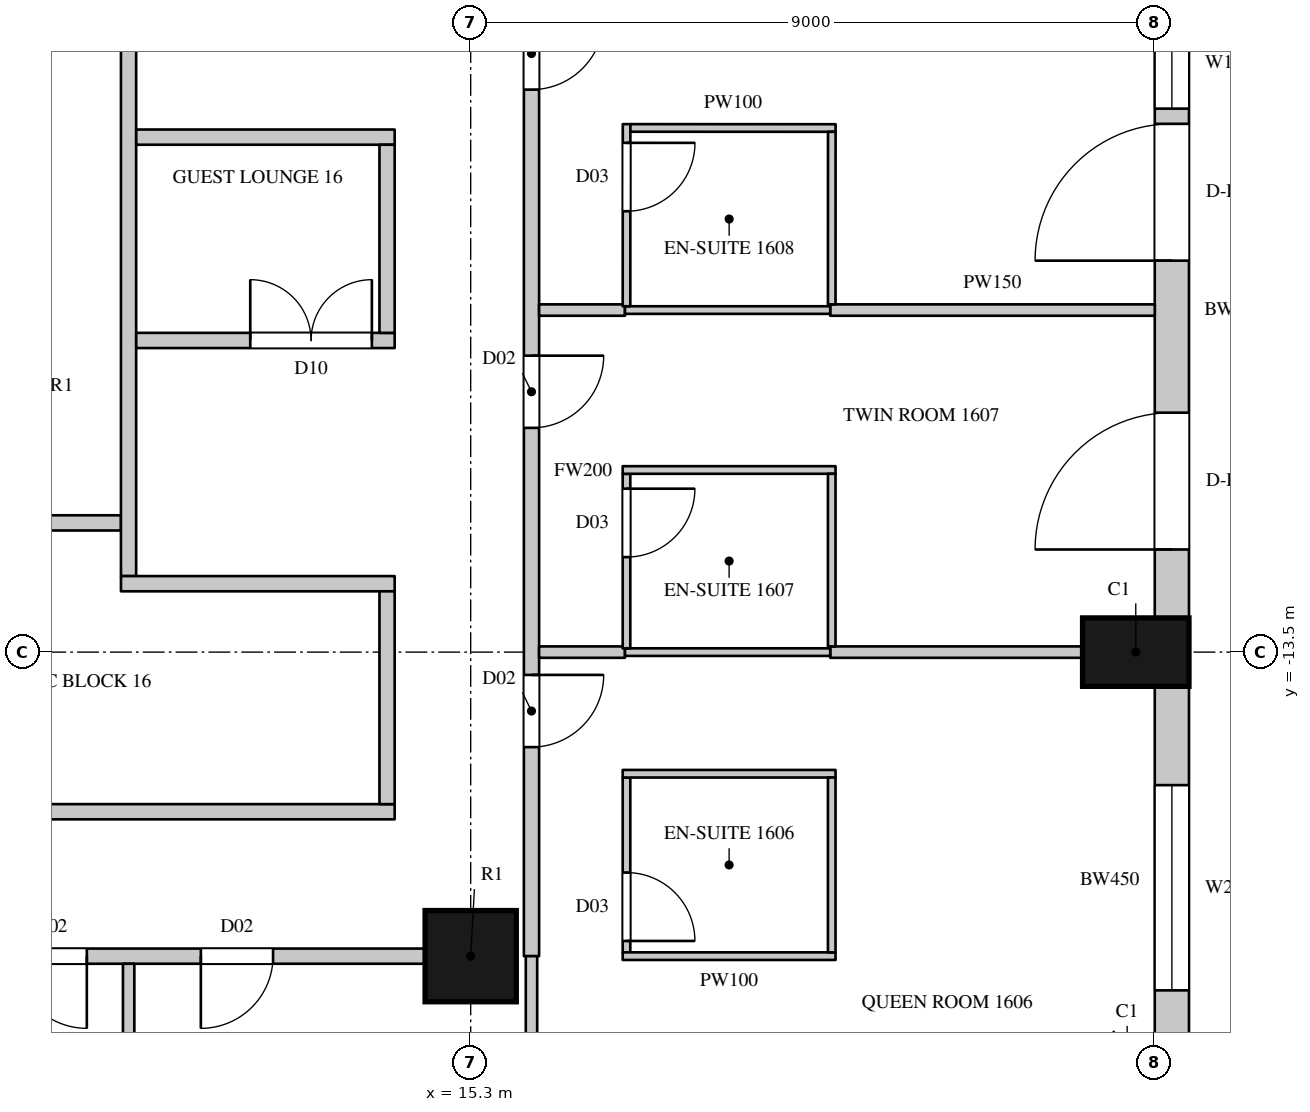
"""IFC4 building model, lengths in metres.
Left out: names, types, materials, properties, quantities, classifications, styles, units other than length and angle.
Written with IfcOpenShell. Run it as: python <this file> out.ifc"""

import sys

from ifc_helpers import new_model, si_unit, direction, frame, frame_2d, origin, origin_2d, place, context, subcontext, project, spatial, rectangle, circle, extrude, element, fill, save


model = new_model("IFC4")
c1 = context("Model", 3, precision=1e-05, world=origin(), true_north=direction((0.0, 1.0)))
c2 = subcontext(c1, "Body", "Model", "MODEL_VIEW")
j1 = project(units=[si_unit("LENGTHUNIT", "METRE"), si_unit("PLANEANGLEUNIT", "RADIAN")], contexts=[c1])
p1 = place(None, origin())
s1 = spatial("IfcSite", under=j1, at=p1, CompositionType="ELEMENT")
p2 = place(p1, origin())
s2 = spatial("IfcBuilding", under=s1, at=p2, CompositionType="ELEMENT")
p3 = place(p2, frame((0.0, 0.0, 87.9)))
s3 = spatial("IfcBuildingStorey", under=s2, at=p3, CompositionType="ELEMENT", Elevation=87.9)
p4 = place(p3, frame((24.05, -13.5, 0.0), z_axis=(0.0, 0.0, 1.0), x_axis=(0.0, 1.0, 0.0)))
e1 = element("IfcColumn", 1, at=p4, inside=s3, PredefinedType="COLUMN", context=c2, shape_type="SweptSolid", body=[
    extrude(rectangle(XDim=0.9, YDim=1.4, at=origin_2d()), origin(), (0.0, 0.0, 1.0), 3.6),
])
p5 = place(p3, frame((15.3, -17.5, 0.0), z_axis=(0.0, 0.0, 1.0), x_axis=(1.0, 0.0, 0.0)))
e2 = element("IfcColumn", 2, at=p5, inside=s3, PredefinedType="COLUMN", context=c2, shape_type="SweptSolid", body=[
    extrude(circle(Radius=0.6, at=origin_2d()), origin(), (0.0, 0.0, 1.0), 3.6),
])
p6 = place(p3, frame((24.525, -19.064, 0.0), z_axis=(0.0, 0.0, 1.0), x_axis=(0.0, 1.0, 0.0)))
e3 = element("IfcWall", 3, at=p6, inside=s3, PredefinedType="SOLIDWALL", context=c2, shape_type="SweptSolid", body=[
    extrude(rectangle(XDim=5.114, YDim=0.45, at=frame_2d((2.557, 0.0))), origin(), (0.0, 0.0, 1.0), 3.3),
])
p7 = place(p6, frame((1.114, 0.0, 1.05)))
e4 = element("IfcOpeningElement", 4, at=p7, cuts=e3, PredefinedType="OPENING", context=c2, shape_type="SweptSolid", body=[
    extrude(rectangle(XDim=2.7, YDim=2.0, at=frame_2d((1.35, 1.0))), frame((0.0, 0.235, 0.0), z_axis=(0.0, -1.0, 0.0), x_axis=(1.0, 0.0, 0.0)), (0.0, 0.0, 1.0), 0.47),
])
p8 = place(p3, frame((24.525, -13.05, 0.0), z_axis=(0.0, 0.0, 1.0), x_axis=(0.0, 1.0, 0.0)))
e5 = element("IfcWall", 5, at=p8, inside=s3, PredefinedType="SOLIDWALL", context=c2, shape_type="SweptSolid", body=[
    extrude(rectangle(XDim=8.1, YDim=0.45, at=frame_2d((4.05, 0.0))), origin(), (0.0, 0.0, 1.0), 3.3),
])
p9 = place(p8, frame((0.9, 0.0, 0.0)))
e6 = element("IfcOpeningElement", 6, at=p9, cuts=e5, PredefinedType="OPENING", context=c2, shape_type="SweptSolid", body=[
    extrude(rectangle(XDim=1.8, YDim=2.4, at=frame_2d((0.9, 1.2))), frame((0.0, 0.235, 0.0), z_axis=(0.0, -1.0, 0.0), x_axis=(1.0, 0.0, 0.0)), (0.0, 0.0, 1.0), 0.47),
])
p10 = place(p8, frame((4.7, 0.0, 0.0)))
e7 = element("IfcOpeningElement", 7, at=p10, cuts=e5, PredefinedType="OPENING", context=c2, shape_type="SweptSolid", body=[
    extrude(rectangle(XDim=1.8, YDim=2.4, at=frame_2d((0.9, 1.2))), frame((0.0, 0.235, 0.0), z_axis=(0.0, -1.0, 0.0), x_axis=(1.0, 0.0, 0.0)), (0.0, 0.0, 1.0), 0.47),
])
p11 = place(p8, frame((6.7, 0.0, 1.05)))
e8 = element("IfcOpeningElement", 8, at=p11, cuts=e5, PredefinedType="OPENING", context=c2, shape_type="SweptSolid", body=[
    extrude(rectangle(XDim=1.2, YDim=2.0, at=frame_2d((0.6, 1.0))), frame((0.0, 0.235, 0.0), z_axis=(0.0, -1.0, 0.0), x_axis=(1.0, 0.0, 0.0)), (0.0, 0.0, 1.0), 0.47),
])
p12 = place(p3, frame((6.9, -17.5, 0.0), z_axis=(0.0, 0.0, 1.0), x_axis=(1.0, 0.0, 0.0)))
e9 = element("IfcWall", 9, at=p12, inside=s3, PredefinedType="PARTITIONING", context=c2, shape_type="SweptSolid", body=[
    extrude(rectangle(XDim=7.8, YDim=0.2, at=frame_2d((3.9, 0.0))), origin(), (0.0, 0.0, 1.0), 2.75),
])
p13 = place(p12, frame((2.4, 0.0, 0.0)))
e10 = element("IfcOpeningElement", 10, at=p13, cuts=e9, PredefinedType="OPENING", context=c2, shape_type="SweptSolid", body=[
    extrude(rectangle(XDim=0.95, YDim=2.2, at=frame_2d((0.475, 1.1))), frame((0.0, 0.11, 0.0), z_axis=(0.0, -1.0, 0.0), x_axis=(1.0, 0.0, 0.0)), (0.0, 0.0, 1.0), 0.22),
])
p14 = place(p12, frame((4.85, 0.0, 0.0)))
e11 = element("IfcOpeningElement", 11, at=p14, cuts=e9, PredefinedType="OPENING", context=c2, shape_type="SweptSolid", body=[
    extrude(rectangle(XDim=0.95, YDim=2.2, at=frame_2d((0.475, 1.1))), frame((0.0, 0.11, 0.0), z_axis=(0.0, -1.0, 0.0), x_axis=(1.0, 0.0, 0.0)), (0.0, 0.0, 1.0), 0.22),
])
p15 = place(p3, frame((-8.7, -11.8, 0.0), z_axis=(0.0, 0.0, 1.0), x_axis=(1.0, 0.0, 0.0)))
e12 = element("IfcWall", 12, at=p15, inside=s3, PredefinedType="PARTITIONING", context=c2, shape_type="SweptSolid", body=[
    extrude(rectangle(XDim=19.4, YDim=0.2, at=frame_2d((9.7, 0.0))), origin(), (0.0, 0.0, 1.0), 3.3),
])
p16 = place(p15, frame((6.95, 0.0, 0.0)))
e13 = element("IfcOpeningElement", 13, at=p16, cuts=e12, PredefinedType="OPENING", context=c2, shape_type="SweptSolid", body=[
    extrude(rectangle(XDim=1.5, YDim=2.2, at=frame_2d((0.75, 1.1))), frame((0.0, 0.11, 0.0), z_axis=(0.0, -1.0, 0.0), x_axis=(1.0, 0.0, 0.0)), (0.0, 0.0, 1.0), 0.22),
])
p17 = place(p3, frame((0.1, -15.6, 0.0), z_axis=(0.0, 0.0, 1.0), x_axis=(1.0, 0.0, 0.0)))
e14 = element("IfcWall", 14, at=p17, inside=s3, PredefinedType="PARTITIONING", context=c2, shape_type="SweptSolid", body=[
    extrude(rectangle(XDim=14.2, YDim=0.2, at=frame_2d((7.1, 0.0))), origin(), (0.0, 0.0, 1.0), 3.3),
])
p18 = place(p3, frame((10.799, -12.5, 0.0), z_axis=(0.0, 0.0, 1.0), x_axis=(0.0, 1.0, 0.0)))
e15 = element("IfcWall", 15, at=p18, inside=s3, PredefinedType="PARTITIONING", context=c2, shape_type="SweptSolid", body=[
    extrude(rectangle(XDim=24.2, YDim=0.2, at=frame_2d((12.1, 0.0))), origin(), (0.0, 0.0, 1.0), 3.3),
])
p19 = place(p18, frame((13.15, 0.0, 0.0)))
e16 = element("IfcOpeningElement", 16, at=p19, cuts=e15, PredefinedType="OPENING", context=c2, shape_type="SweptSolid", body=[
    extrude(rectangle(XDim=1.5, YDim=2.2, at=frame_2d((0.75, 1.1))), frame((0.0, 0.11, 0.0), z_axis=(0.0, -1.0, 0.0), x_axis=(1.0, 0.0, 0.0)), (0.0, 0.0, 1.0), 0.22),
])
p20 = place(p3, frame((10.699, -12.6, 0.0), z_axis=(0.0, 0.0, 1.0), x_axis=(1.0, 0.0, 0.0)))
e17 = element("IfcWall", 17, at=p20, inside=s3, PredefinedType="PARTITIONING", context=c2, shape_type="SweptSolid", body=[
    extrude(rectangle(XDim=3.601, YDim=0.2, at=frame_2d((1.801, 0.0))), origin(), (0.0, 0.0, 1.0), 3.3),
])
p21 = place(p3, frame((10.9, -9.4, 0.0), z_axis=(0.0, 0.0, 1.0), x_axis=(1.0, 0.0, 0.0)))
e18 = element("IfcWall", 18, at=p21, inside=s3, PredefinedType="PARTITIONING", context=c2, shape_type="SweptSolid", body=[
    extrude(rectangle(XDim=3.4, YDim=0.2, at=frame_2d((1.7, 0.0))), origin(), (0.0, 0.0, 1.0), 3.3),
])
p22 = place(p21, frame((1.5, 0.0, 0.0)))
e19 = element("IfcOpeningElement", 19, at=p22, cuts=e18, PredefinedType="OPENING", context=c2, shape_type="SweptSolid", body=[
    extrude(rectangle(XDim=1.6, YDim=2.4, at=frame_2d((0.8, 1.2))), frame((0.0, 0.11, 0.0), z_axis=(0.0, -1.0, 0.0), x_axis=(1.0, 0.0, 0.0)), (0.0, 0.0, 1.0), 0.22),
])
p23 = place(p3, frame((10.9, -6.725, 0.0), z_axis=(0.0, 0.0, 1.0), x_axis=(1.0, 0.0, 0.0)))
e20 = element("IfcWall", 20, at=p23, inside=s3, PredefinedType="PARTITIONING", context=c2, shape_type="SweptSolid", body=[
    extrude(rectangle(XDim=3.4, YDim=0.2, at=frame_2d((1.7, 0.0))), origin(), (0.0, 0.0, 1.0), 3.3),
])
p24 = place(p3, frame((14.2, -15.5, 0.0), z_axis=(0.0, 0.0, 1.0), x_axis=(0.0, 1.0, 0.0)))
e21 = element("IfcWall", 21, at=p24, inside=s3, PredefinedType="PARTITIONING", context=c2, shape_type="SweptSolid", body=[
    extrude(rectangle(XDim=2.8, YDim=0.2, at=frame_2d((1.4, 0.0))), origin(), (0.0, 0.0, 1.0), 3.3),
])
p25 = place(p3, frame((14.2, -9.3, 0.0), z_axis=(0.0, 0.0, 1.0), x_axis=(0.0, 1.0, 0.0)))
e22 = element("IfcWall", 22, at=p25, inside=s3, PredefinedType="PARTITIONING", context=c2, shape_type="SweptSolid", body=[
    extrude(rectangle(XDim=2.475, YDim=0.2, at=frame_2d((1.238, 0.0))), origin(), (0.0, 0.0, 1.0), 3.3),
])
p26 = place(p3, frame((16.1, -17.5, 0.0), z_axis=(0.0, 0.0, 1.0), x_axis=(0.0, 1.0, 0.0)))
e23 = element("IfcWall", 23, at=p26, inside=s3, PredefinedType="PARTITIONING", context=c2, shape_type="SweptSolid", body=[
    extrude(rectangle(XDim=12.75, YDim=0.2, at=frame_2d((6.375, 0.0))), origin(), (0.0, 0.0, 1.0), 3.3),
])
p27 = place(p26, frame((2.75, 0.0, 0.0)))
e24 = element("IfcOpeningElement", 24, at=p27, cuts=e23, PredefinedType="OPENING", context=c2, shape_type="SweptSolid", body=[
    extrude(rectangle(XDim=0.95, YDim=2.2, at=frame_2d((0.475, 1.1))), frame((0.0, 0.11, 0.0), z_axis=(0.0, -1.0, 0.0), x_axis=(1.0, 0.0, 0.0)), (0.0, 0.0, 1.0), 0.22),
])
p28 = place(p26, frame((6.95, 0.0, 0.0)))
e25 = element("IfcOpeningElement", 25, at=p28, cuts=e23, PredefinedType="OPENING", context=c2, shape_type="SweptSolid", body=[
    extrude(rectangle(XDim=0.95, YDim=2.2, at=frame_2d((0.475, 1.1))), frame((0.0, 0.11, 0.0), z_axis=(0.0, -1.0, 0.0), x_axis=(1.0, 0.0, 0.0)), (0.0, 0.0, 1.0), 0.22),
])
p29 = place(p26, frame((11.4, 0.0, 0.0)))
e26 = element("IfcOpeningElement", 26, at=p29, cuts=e23, PredefinedType="OPENING", context=c2, shape_type="SweptSolid", body=[
    extrude(rectangle(XDim=0.95, YDim=2.2, at=frame_2d((0.475, 1.1))), frame((0.0, 0.11, 0.0), z_axis=(0.0, -1.0, 0.0), x_axis=(1.0, 0.0, 0.0)), (0.0, 0.0, 1.0), 0.22),
])
p30 = place(p3, frame((10.8, -25.7, 0.0), z_axis=(0.0, 0.0, 1.0), x_axis=(0.0, 1.0, 0.0)))
e27 = element("IfcWall", 27, at=p30, inside=s3, PredefinedType="PARTITIONING", context=c2, shape_type="SweptSolid", body=[
    extrude(rectangle(XDim=8.1, YDim=0.15, at=frame_2d((4.05, 0.0))), origin(), (0.0, 0.0, 1.0), 2.65),
])
p31 = place(p3, frame((16.1, -18.73, 0.0), z_axis=(0.0, 0.0, 1.0), x_axis=(0.0, 1.0, 0.0)))
e28 = element("IfcWall", 28, at=p31, inside=s3, PredefinedType="PARTITIONING", context=c2, shape_type="SweptSolid", body=[
    extrude(rectangle(XDim=1.23, YDim=0.15, at=frame_2d((0.615, 0.0))), origin(), (0.0, 0.0, 1.0), 3.3),
])
p32 = place(p3, frame((16.2, -13.5, 0.0), z_axis=(0.0, 0.0, 1.0), x_axis=(1.0, 0.0, 0.0)))
e29 = element("IfcWall", 29, at=p32, inside=s3, PredefinedType="PARTITIONING", context=c2, shape_type="SweptSolid", body=[
    extrude(rectangle(XDim=1.13, YDim=0.15, at=frame_2d((0.565, 0.0))), origin(), (0.0, 0.0, 1.0), 3.3),
])
p33 = place(p3, frame((16.2, -9.0, 0.0), z_axis=(0.0, 0.0, 1.0), x_axis=(1.0, 0.0, 0.0)))
e30 = element("IfcWall", 30, at=p33, inside=s3, PredefinedType="PARTITIONING", context=c2, shape_type="SweptSolid", body=[
    extrude(rectangle(XDim=1.13, YDim=0.15, at=frame_2d((0.565, 0.0))), origin(), (0.0, 0.0, 1.0), 2.65),
])
p34 = place(p3, frame((20.03, -13.5, 0.0), z_axis=(0.0, 0.0, 1.0), x_axis=(1.0, 0.0, 0.0)))
e31 = element("IfcWall", 31, at=p34, inside=s3, PredefinedType="PARTITIONING", context=c2, shape_type="SweptSolid", body=[
    extrude(rectangle(XDim=3.32, YDim=0.15, at=frame_2d((1.66, 0.0))), origin(), (0.0, 0.0, 1.0), 3.3),
])
p35 = place(p3, frame((20.03, -9.0, 0.0), z_axis=(0.0, 0.0, 1.0), x_axis=(1.0, 0.0, 0.0)))
e32 = element("IfcWall", 32, at=p35, inside=s3, PredefinedType="PARTITIONING", context=c2, shape_type="SweptSolid", body=[
    extrude(rectangle(XDim=4.27, YDim=0.15, at=frame_2d((2.135, 0.0))), origin(), (0.0, 0.0, 1.0), 2.65),
])
p36 = place(p3, frame((17.33, -13.5, 0.0), z_axis=(0.0, 0.0, 1.0), x_axis=(1.0, 0.0, 0.0)))
e33 = element("IfcWall", 33, at=p36, inside=s3, PredefinedType="PARTITIONING", context=c2, shape_type="SweptSolid", body=[
    extrude(rectangle(XDim=2.7, YDim=0.1, at=frame_2d((1.35, 0.0))), origin(), (0.0, 0.0, 1.0), 3.3),
])
p37 = place(p3, frame((17.33, -9.0, 0.0), z_axis=(0.0, 0.0, 1.0), x_axis=(1.0, 0.0, 0.0)))
e34 = element("IfcWall", 34, at=p37, inside=s3, PredefinedType="PARTITIONING", context=c2, shape_type="SweptSolid", body=[
    extrude(rectangle(XDim=2.7, YDim=0.1, at=frame_2d((1.35, 0.0))), origin(), (0.0, 0.0, 1.0), 2.65),
])
p38 = place(p3, frame((17.35, -17.45, 0.0), z_axis=(0.0, 0.0, 1.0), x_axis=(0.0, 1.0, 0.0)))
e35 = element("IfcWall", 35, at=p38, inside=s3, PredefinedType="PARTITIONING", context=c2, shape_type="SweptSolid", body=[
    extrude(rectangle(XDim=2.3, YDim=0.1, at=frame_2d((1.15, 0.0))), origin(), (0.0, 0.0, 1.0), 3.3),
])
p39 = place(p38, frame((0.15, 0.0, 0.0)))
e36 = element("IfcOpeningElement", 36, at=p39, cuts=e35, PredefinedType="OPENING", context=c2, shape_type="SweptSolid", body=[
    extrude(rectangle(XDim=0.9, YDim=2.2, at=frame_2d((0.45, 1.1))), frame((0.0, 0.06, 0.0), z_axis=(0.0, -1.0, 0.0), x_axis=(1.0, 0.0, 0.0)), (0.0, 0.0, 1.0), 0.12),
])
for number, where, z_axis, x_axis in (
    (37, (17.3, -17.5, 0.0), (0.0, 0.0, 1.0), (1.0, 0.0, 0.0)),
    (38, (17.3, -15.1, 0.0), (0.0, 0.0, 1.0), (1.0, 0.0, 0.0)),
):
    element("IfcWall", number, at=place(p3, frame(where, z_axis=z_axis, x_axis=x_axis)), inside=s3, PredefinedType="PARTITIONING", context=c2, shape_type="SweptSolid", body=[
        extrude(rectangle(XDim=2.8, YDim=0.1, at=frame_2d((1.4, 0.0))), origin(), (0.0, 0.0, 1.0), 3.3),
    ])
p40 = place(p3, frame((17.35, -13.45, 0.0), z_axis=(0.0, 0.0, 1.0), x_axis=(0.0, 1.0, 0.0)))
e39 = element("IfcWall", 39, at=p40, inside=s3, PredefinedType="PARTITIONING", context=c2, shape_type="SweptSolid", body=[
    extrude(rectangle(XDim=2.296, YDim=0.1, at=frame_2d((1.148, 0.0))), origin(), (0.0, 0.0, 1.0), 3.3),
])
p41 = place(p40, frame((1.2, 0.0, 0.0)))
e40 = element("IfcOpeningElement", 40, at=p41, cuts=e39, PredefinedType="OPENING", context=c2, shape_type="SweptSolid", body=[
    extrude(rectangle(XDim=0.9, YDim=2.2, at=frame_2d((0.45, 1.1))), frame((0.0, 0.06, 0.0), z_axis=(0.0, -1.0, 0.0), x_axis=(1.0, 0.0, 0.0)), (0.0, 0.0, 1.0), 0.12),
])
p42 = place(p3, frame((17.3, -11.104, 0.0), z_axis=(0.0, 0.0, 1.0), x_axis=(1.0, 0.0, 0.0)))
e41 = element("IfcWall", 41, at=p42, inside=s3, PredefinedType="PARTITIONING", context=c2, shape_type="SweptSolid", body=[
    extrude(rectangle(XDim=2.8, YDim=0.1, at=frame_2d((1.4, 0.0))), origin(), (0.0, 0.0, 1.0), 3.3),
])
p43 = place(p3, frame((17.35, -8.95, 0.0), z_axis=(0.0, 0.0, 1.0), x_axis=(0.000407580973, 0.999999916939, 0.0)))
e42 = element("IfcWall", 42, at=p43, inside=s3, PredefinedType="PARTITIONING", context=c2, shape_type="SweptSolid", body=[
    extrude(rectangle(XDim=2.396, YDim=0.1, at=frame_2d((1.198, 0.0))), origin(), (0.0, 0.0, 1.0), 3.3),
])
p44 = place(p43, frame((1.25, 0.0, 0.0)))
e43 = element("IfcOpeningElement", 43, at=p44, cuts=e42, PredefinedType="OPENING", context=c2, shape_type="SweptSolid", body=[
    extrude(rectangle(XDim=0.9, YDim=2.2, at=frame_2d((0.45, 1.1))), frame((0.0, 0.06, 0.0), z_axis=(0.0, -1.0, 0.0), x_axis=(1.0, 0.0, 0.0)), (0.0, 0.0, 1.0), 0.12),
])
p45 = place(p3, frame((17.401, -6.604, 0.0), z_axis=(0.0, 0.0, 1.0), x_axis=(0.9999999346, -0.000361663629, 0.0)))
e44 = element("IfcWall", 44, at=p45, inside=s3, PredefinedType="PARTITIONING", context=c2, shape_type="SweptSolid", body=[
    extrude(rectangle(XDim=2.7, YDim=0.1, at=frame_2d((1.35, 0.0))), origin(), (0.0, 0.0, 1.0), 3.3),
])
p46 = place(p3, frame((20.05, -17.45, 0.0), z_axis=(0.0, 0.0, 1.0), x_axis=(0.0, 1.0, 0.0)))
e45 = element("IfcWall", 45, at=p46, inside=s3, PredefinedType="PARTITIONING", context=c2, shape_type="SweptSolid", body=[
    extrude(rectangle(XDim=2.3, YDim=0.1, at=frame_2d((1.15, 0.0))), origin(), (0.0, 0.0, 1.0), 3.3),
])
p47 = place(p3, frame((20.05, -13.425, 0.0), z_axis=(0.0, 0.0, 1.0), x_axis=(0.0, 1.0, 0.0)))
e46 = element("IfcWall", 46, at=p47, inside=s3, PredefinedType="PARTITIONING", context=c2, shape_type="SweptSolid", body=[
    extrude(rectangle(XDim=2.271, YDim=0.1, at=frame_2d((1.135, 0.0))), origin(), (0.0, 0.0, 1.0), 3.3),
])
p48 = place(p3, frame((20.05, -8.925, 0.0), z_axis=(0.0, 0.0, 1.0), x_axis=(0.000430200003, 0.999999907464, 0.0)))
e47 = element("IfcWall", 47, at=p48, inside=s3, PredefinedType="PARTITIONING", context=c2, shape_type="SweptSolid", body=[
    extrude(rectangle(XDim=2.27, YDim=0.1, at=frame_2d((1.135, 0.0))), origin(), (0.0, 0.0, 1.0), 3.3),
])
p49 = place(p7, origin())
e48 = element("IfcWindow", 48, at=p49, inside=s3, PartitioningType="SINGLE_PANEL", PredefinedType="WINDOW", context=c2, shape_type="SweptSolid", body=[
    extrude(rectangle(XDim=2.7, YDim=2.0, at=frame_2d((1.35, 1.0))), frame((0.0, 0.135, 0.0), z_axis=(0.0, -1.0, 0.0), x_axis=(1.0, 0.0, 0.0)), (0.0, 0.0, 1.0), 0.06),
])
fill(e4, e48)
p50 = place(p9, origin())
e49 = element("IfcDoor", 49, at=p50, inside=s3, OperationType="SLIDING_TO_LEFT", PredefinedType="DOOR", context=c2, shape_type="SweptSolid", body=[
    extrude(rectangle(XDim=1.8, YDim=2.4, at=frame_2d((0.9, 1.2))), frame((0.0, 0.13, 0.0), z_axis=(0.0, -1.0, 0.0), x_axis=(1.0, 0.0, 0.0)), (0.0, 0.0, 1.0), 0.05),
])
fill(e6, e49)
p51 = place(p10, origin())
e50 = element("IfcDoor", 50, at=p51, inside=s3, OperationType="SLIDING_TO_LEFT", PredefinedType="DOOR", context=c2, shape_type="SweptSolid", body=[
    extrude(rectangle(XDim=1.8, YDim=2.4, at=frame_2d((0.9, 1.2))), frame((0.0, 0.13, 0.0), z_axis=(0.0, -1.0, 0.0), x_axis=(1.0, 0.0, 0.0)), (0.0, 0.0, 1.0), 0.05),
])
fill(e7, e50)
p52 = place(p11, origin())
e51 = element("IfcWindow", 51, at=p52, inside=s3, PartitioningType="SINGLE_PANEL", PredefinedType="WINDOW", context=c2, shape_type="SweptSolid", body=[
    extrude(rectangle(XDim=1.2, YDim=2.0, at=frame_2d((0.6, 1.0))), frame((0.0, 0.135, 0.0), z_axis=(0.0, -1.0, 0.0), x_axis=(1.0, 0.0, 0.0)), (0.0, 0.0, 1.0), 0.06),
])
fill(e8, e51)
p53 = place(p22, origin())
e52 = element("IfcDoor", 52, at=p53, inside=s3, OperationType="DOUBLE_DOOR_SINGLE_SWING", PredefinedType="DOOR", context=c2, shape_type="SweptSolid", body=[
    extrude(rectangle(XDim=1.6, YDim=2.4, at=frame_2d((0.8, 1.2))), frame((0.0, 0.025, 0.0), z_axis=(0.0, -1.0, 0.0), x_axis=(1.0, 0.0, 0.0)), (0.0, 0.0, 1.0), 0.05),
])
fill(e19, e52)
p54 = place(p27, origin())
e53 = element("IfcDoor", 53, at=p54, inside=s3, OperationType="SINGLE_SWING_LEFT", PredefinedType="DOOR", context=c2, shape_type="SweptSolid", body=[
    extrude(rectangle(XDim=0.95, YDim=2.2, at=frame_2d((0.475, 1.1))), frame((0.0, 0.025, 0.0), z_axis=(0.0, -1.0, 0.0), x_axis=(1.0, 0.0, 0.0)), (0.0, 0.0, 1.0), 0.05),
])
fill(e24, e53)
p55 = place(p39, origin())
e54 = element("IfcDoor", 54, at=p55, inside=s3, OperationType="SINGLE_SWING_RIGHT", PredefinedType="DOOR", context=c2, shape_type="SweptSolid", body=[
    extrude(rectangle(XDim=0.9, YDim=2.2, at=frame_2d((0.45, 1.1))), frame((0.0, 0.025, 0.0), z_axis=(0.0, -1.0, 0.0), x_axis=(1.0, 0.0, 0.0)), (0.0, 0.0, 1.0), 0.05),
])
fill(e36, e54)
p56 = place(p28, origin())
e55 = element("IfcDoor", 55, at=p56, inside=s3, OperationType="SINGLE_SWING_LEFT", PredefinedType="DOOR", context=c2, shape_type="SweptSolid", body=[
    extrude(rectangle(XDim=0.95, YDim=2.2, at=frame_2d((0.475, 1.1))), frame((0.0, 0.025, 0.0), z_axis=(0.0, -1.0, 0.0), x_axis=(1.0, 0.0, 0.0)), (0.0, 0.0, 1.0), 0.05),
])
fill(e25, e55)
p57 = place(p41, origin())
e56 = element("IfcDoor", 56, at=p57, inside=s3, OperationType="SINGLE_SWING_LEFT", PredefinedType="DOOR", context=c2, shape_type="SweptSolid", body=[
    extrude(rectangle(XDim=0.9, YDim=2.2, at=frame_2d((0.45, 1.1))), frame((0.0, 0.025, 0.0), z_axis=(0.0, -1.0, 0.0), x_axis=(1.0, 0.0, 0.0)), (0.0, 0.0, 1.0), 0.05),
])
fill(e40, e56)
p58 = place(p29, origin())
e57 = element("IfcDoor", 57, at=p58, inside=s3, OperationType="SINGLE_SWING_LEFT", PredefinedType="DOOR", context=c2, shape_type="SweptSolid", body=[
    extrude(rectangle(XDim=0.95, YDim=2.2, at=frame_2d((0.475, 1.1))), frame((0.0, 0.025, 0.0), z_axis=(0.0, -1.0, 0.0), x_axis=(1.0, 0.0, 0.0)), (0.0, 0.0, 1.0), 0.05),
])
fill(e26, e57)
p59 = place(p44, origin())
e58 = element("IfcDoor", 58, at=p59, inside=s3, OperationType="SINGLE_SWING_LEFT", PredefinedType="DOOR", context=c2, shape_type="SweptSolid", body=[
    extrude(rectangle(XDim=0.9, YDim=2.2, at=frame_2d((0.45, 1.1))), frame((0.0, 0.025, 0.0), z_axis=(0.0, -1.0, 0.0), x_axis=(1.0, 0.0, 0.0)), (0.0, 0.0, 1.0), 0.05),
])
fill(e43, e58)
p60 = place(p13, origin())
e59 = element("IfcDoor", 59, at=p60, inside=s3, OperationType="SINGLE_SWING_LEFT", PredefinedType="DOOR", context=c2, shape_type="SweptSolid", body=[
    extrude(rectangle(XDim=0.95, YDim=2.2, at=frame_2d((0.475, 1.1))), frame((0.0, 0.025, 0.0), z_axis=(0.0, -1.0, 0.0), x_axis=(1.0, 0.0, 0.0)), (0.0, 0.0, 1.0), 0.05),
])
fill(e10, e59)
p61 = place(p14, origin())
e60 = element("IfcDoor", 60, at=p61, inside=s3, OperationType="SINGLE_SWING_RIGHT", PredefinedType="DOOR", context=c2, shape_type="SweptSolid", body=[
    extrude(rectangle(XDim=0.95, YDim=2.2, at=frame_2d((0.475, 1.1))), frame((0.0, 0.025, 0.0), z_axis=(0.0, -1.0, 0.0), x_axis=(1.0, 0.0, 0.0)), (0.0, 0.0, 1.0), 0.05),
])
fill(e11, e60)
save(model, sys.argv[1])
